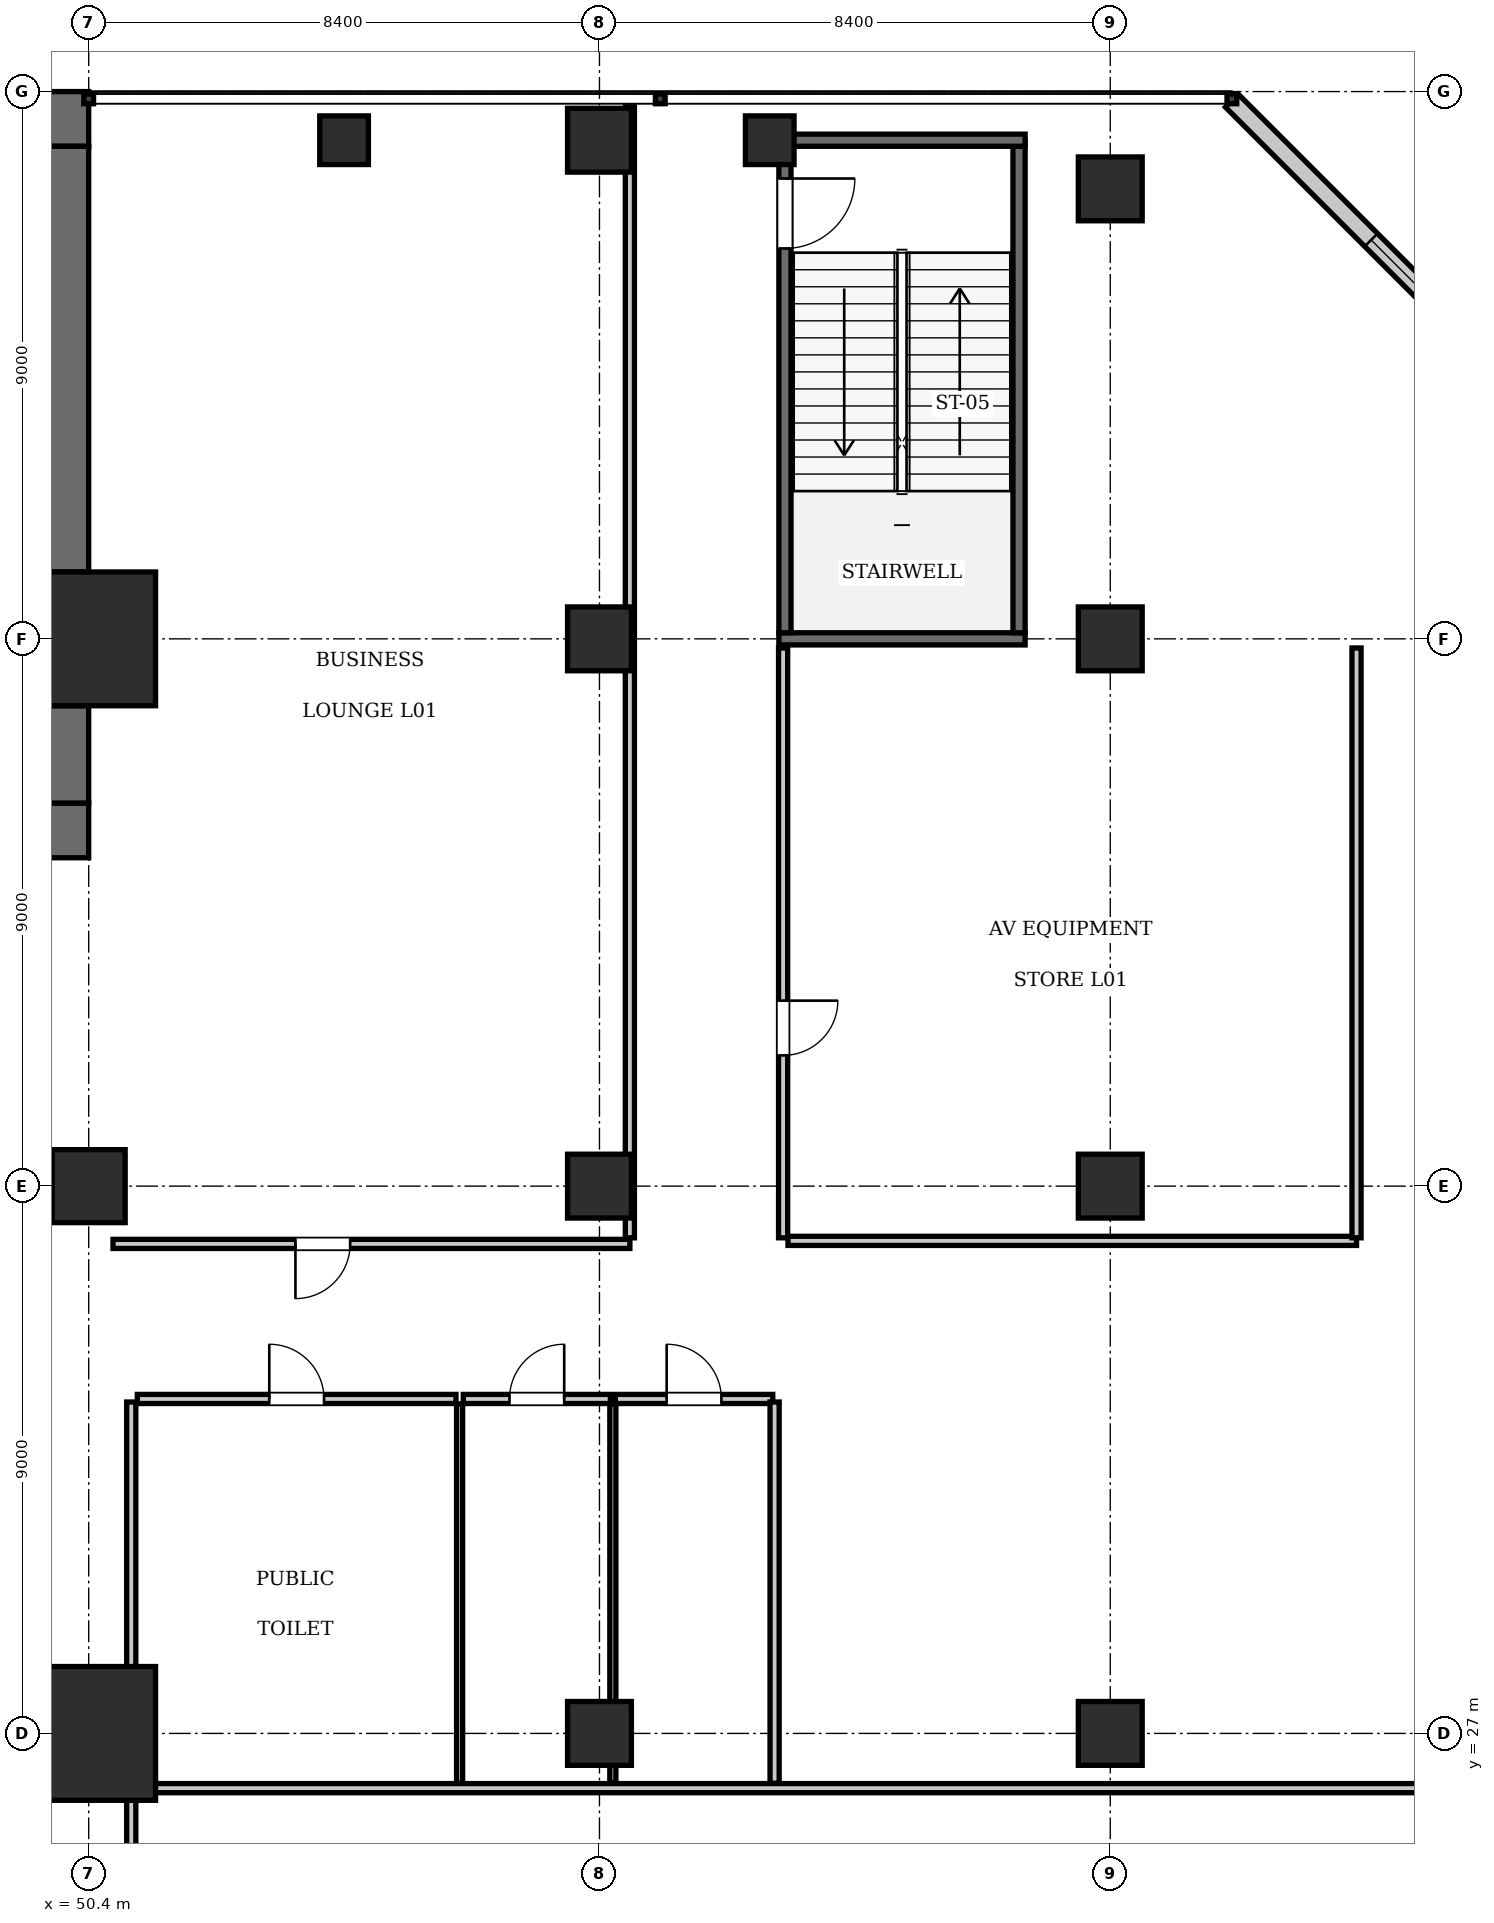
"""IFC4 building model, lengths in metres.
Left out: names, types, materials, properties, quantities, classifications, styles, units other than length and angle.
Written with IfcOpenShell. Run it as: python <this file> out.ifc"""

import sys

from ifc_helpers import new_model, si_unit, direction, frame, frame_2d, origin, origin_2d, place, context, subcontext, project, spatial, rectangle, extrude, element, fill, save


model = new_model("IFC4")
c1 = context("Model", 3, precision=1e-05, world=origin(), true_north=direction((0.0, 1.0)))
c2 = subcontext(c1, "Body", "Model", "MODEL_VIEW")
j1 = project(units=[si_unit("LENGTHUNIT", "METRE"), si_unit("PLANEANGLEUNIT", "RADIAN")], contexts=[c1])
p1 = place(None, origin())
s1 = spatial("IfcSite", under=j1, at=p1, CompositionType="ELEMENT")
p2 = place(p1, origin())
s2 = spatial("IfcBuilding", under=s1, at=p2, CompositionType="ELEMENT")
p3 = place(p2, frame((0.0, 0.0, 5.6)))
s3 = spatial("IfcBuildingStorey", under=s2, at=p3, CompositionType="ELEMENT", Elevation=5.6)
for number, where, z_axis, x_axis in (
    (1, (50.4, 27.0, 0.0), (0.0, 0.0, 1.0), (1.0, 0.0, 0.0)),
    (2, (50.4, 45.0, 0.0), (0.0, 0.0, 1.0), (1.0, 0.0, 0.0)),
):
    element("IfcColumn", number, at=place(p3, frame(where, z_axis=z_axis, x_axis=x_axis)), inside=s3, PredefinedType="COLUMN", context=c2, shape_type="SweptSolid", body=[
        extrude(rectangle(XDim=2.2, YDim=2.2, at=origin_2d()), origin(), (0.0, 0.0, 1.0), 5.25),
    ])
p4 = place(p3, frame((25.2, 53.55, 0.0), z_axis=(0.0, 0.0, 1.0), x_axis=(1.0, 0.0, 0.0)))
e3 = element("IfcWall", 3, at=p4, inside=s3, PredefinedType="SHEAR", context=c2, shape_type="SweptSolid", body=[
    extrude(rectangle(XDim=25.2, YDim=0.9, at=frame_2d((12.6, 0.0))), origin(), (0.0, 0.0, 1.0), 5.25),
])
p5 = place(p3, frame((43.6, 41.85, 0.0), z_axis=(0.0, 0.0, 1.0), x_axis=(1.0, 0.0, 0.0)))
e4 = element("IfcWall", 4, at=p5, inside=s3, PredefinedType="SHEAR", context=c2, shape_type="SweptSolid", body=[
    extrude(rectangle(XDim=6.8, YDim=0.9, at=frame_2d((3.4, 0.0))), origin(), (0.0, 0.0, 1.0), 5.25),
])
p6 = place(p5, frame((3.9, 0.0, 0.0)))
e5 = element("IfcOpeningElement", 5, at=p6, cuts=e4, PredefinedType="OPENING", context=c2, shape_type="SweptSolid", body=[
    extrude(rectangle(XDim=1.15, YDim=2.15, at=frame_2d((0.575, 1.075))), frame((0.0, 0.46, 0.0), z_axis=(0.0, -1.0, 0.0), x_axis=(1.0, 0.0, 0.0)), (0.0, 0.0, 1.0), 0.92),
])
p7 = place(p5, frame((0.55, 0.0, 0.0)))
e6 = element("IfcOpeningElement", 6, at=p7, cuts=e4, PredefinedType="OPENING", context=c2, shape_type="SweptSolid", body=[
    extrude(rectangle(XDim=1.1, YDim=2.2, at=frame_2d((0.55, 1.1))), frame((0.0, 0.46, 0.0), z_axis=(0.0, -1.0, 0.0), x_axis=(1.0, 0.0, 0.0)), (0.0, 0.0, 1.0), 0.92),
])
p8 = place(p3, frame((49.95, 42.3, 0.0), z_axis=(0.0, 0.0, 1.0), x_axis=(0.0, 1.0, 0.0)))
e7 = element("IfcWall", 7, at=p8, inside=s3, PredefinedType="SHEAR", context=c2, shape_type="SweptSolid", body=[
    extrude(rectangle(XDim=1.6, YDim=0.9, at=frame_2d((0.8, 0.0))), origin(), (0.0, 0.0, 1.0), 5.25),
])
p9 = place(p3, frame((49.95, 46.1, 0.0), z_axis=(0.0, 0.0, 1.0), x_axis=(0.0, 1.0, 0.0)))
e8 = element("IfcWall", 8, at=p9, inside=s3, PredefinedType="SHEAR", context=c2, shape_type="SweptSolid", body=[
    extrude(rectangle(XDim=7.0, YDim=0.9, at=frame_2d((3.5, 0.0))), origin(), (0.0, 0.0, 1.0), 5.25),
])
p10 = place(p3, frame((50.4, 36.0, 0.0), z_axis=(0.0, 0.0, 1.0), x_axis=(1.0, 0.0, 0.0)))
e9 = element("IfcColumn", 9, at=p10, inside=s3, PredefinedType="COLUMN", context=c2, shape_type="SweptSolid", body=[
    extrude(rectangle(XDim=1.2, YDim=1.2, at=origin_2d()), origin(), (0.0, 0.0, 1.0), 5.25),
])
for number, where, z_axis, x_axis in (
    (10, (58.8, 27.0, 0.0), (0.0, 0.0, 1.0), (1.0, 0.0, 0.0)),
    (11, (58.8, 36.0, 0.0), (0.0, 0.0, 1.0), (1.0, 0.0, 0.0)),
    (12, (58.8, 45.0, 0.0), (0.0, 0.0, 1.0), (1.0, 0.0, 0.0)),
    (13, (67.2, 27.0, 0.0), (0.0, 0.0, 1.0), (1.0, 0.0, 0.0)),
    (14, (67.2, 36.0, 0.0), (0.0, 0.0, 1.0), (1.0, 0.0, 0.0)),
    (15, (67.2, 45.0, 0.0), (0.0, 0.0, 1.0), (1.0, 0.0, 0.0)),
    (16, (67.2, 52.4, 0.0), (0.0, 0.0, 1.0), (1.0, 0.0, 0.0)),
    (17, (58.8, 53.2, 0.0), (0.0, 0.0, 1.0), (1.0, 0.0, 0.0)),
):
    element("IfcColumn", number, at=place(p3, frame(where, z_axis=z_axis, x_axis=x_axis)), inside=s3, PredefinedType="COLUMN", context=c2, shape_type="SweptSolid", body=[
        extrude(rectangle(XDim=1.05, YDim=1.05, at=origin_2d()), origin(), (0.0, 0.0, 1.0), 5.25),
    ])
for number, where, z_axis, x_axis in (
    (18, (54.6, 53.2, 0.0), (0.0, 0.0, 1.0), (1.0, 0.0, 0.0)),
    (19, (61.6, 53.2, 0.0), (0.0, 0.0, 1.0), (1.0, 0.0, 0.0)),
):
    element("IfcColumn", number, at=place(p3, frame(where, z_axis=z_axis, x_axis=x_axis)), inside=s3, PredefinedType="PILASTER", context=c2, shape_type="SweptSolid", body=[
        extrude(rectangle(XDim=0.8, YDim=0.8, at=origin_2d()), origin(), (0.0, 0.0, 1.0), 5.25),
    ])
p11 = place(p3, frame((61.75, 45.0, 0.0), z_axis=(0.0, 0.0, 1.0), x_axis=(1.0, 0.0, 0.0)))
e20 = element("IfcWall", 20, at=p11, inside=s3, PredefinedType="SOLIDWALL", context=c2, shape_type="SweptSolid", body=[
    extrude(rectangle(XDim=4.05, YDim=0.2, at=frame_2d((2.025, 0.0))), origin(), (0.0, 0.0, 1.0), 4.335),
])
p12 = place(p3, frame((61.85, 45.1, 0.0), z_axis=(0.0, 0.0, 1.0), x_axis=(0.0, 1.0, 0.0)))
e21 = element("IfcWall", 21, at=p12, inside=s3, PredefinedType="SOLIDWALL", context=c2, shape_type="SweptSolid", body=[
    extrude(rectangle(XDim=8.1, YDim=0.2, at=frame_2d((4.05, 0.0))), origin(), (0.0, 0.0, 1.0), 4.97),
])
p13 = place(p12, frame((6.32, 0.0, 0.0)))
e22 = element("IfcOpeningElement", 22, at=p13, cuts=e21, PredefinedType="OPENING", context=c2, shape_type="SweptSolid", body=[
    extrude(rectangle(XDim=1.15, YDim=2.15, at=frame_2d((0.575, 1.075))), frame((0.0, 0.11, 0.0), z_axis=(0.0, -1.0, 0.0), x_axis=(1.0, 0.0, 0.0)), (0.0, 0.0, 1.0), 0.22),
])
p14 = place(p3, frame((65.7, 45.1, 0.0), z_axis=(0.0, 0.0, 1.0), x_axis=(0.0, 1.0, 0.0)))
e23 = element("IfcWall", 23, at=p14, inside=s3, PredefinedType="SOLIDWALL", context=c2, shape_type="SweptSolid", body=[
    extrude(rectangle(XDim=8.1, YDim=0.2, at=frame_2d((4.05, 0.0))), origin(), (0.0, 0.0, 1.0), 4.97),
])
p15 = place(p3, frame((61.75, 53.2, 0.0), z_axis=(0.0, 0.0, 1.0), x_axis=(1.0, 0.0, 0.0)))
e24 = element("IfcWall", 24, at=p15, inside=s3, PredefinedType="SOLIDWALL", context=c2, shape_type="SweptSolid", body=[
    extrude(rectangle(XDim=4.05, YDim=0.2, at=frame_2d((2.025, 0.0))), origin(), (0.0, 0.0, 1.0), 4.97),
])
p16 = place(p3, frame((75.45, 47.6, 0.0), z_axis=(0.0, 0.0, 1.0), x_axis=(-0.707106781187, 0.707106781187, 0.0)))
e25 = element("IfcWall", 25, at=p16, inside=s3, PredefinedType="SOLIDWALL", context=c2, shape_type="SweptSolid", body=[
    extrude(rectangle(XDim=8.839, YDim=0.3, at=frame_2d((4.419, 0.0))), origin(), (0.0, 0.0, 1.0), 4.97),
])
p17 = place(p16, frame((3.2, 0.0, 0.9)))
e26 = element("IfcOpeningElement", 26, at=p17, cuts=e25, PredefinedType="OPENING", context=c2, shape_type="SweptSolid", body=[
    extrude(rectangle(XDim=2.4, YDim=2.6, at=frame_2d((1.2, 1.3))), frame((0.0, 0.16, 0.0), z_axis=(0.0, -1.0, 0.0), x_axis=(1.0, 0.0, 0.0)), (0.0, 0.0, 1.0), 0.32),
])
p18 = place(p3, frame((51.2, 32.5, 0.0), z_axis=(0.0, 0.0, 1.0), x_axis=(1.0, 0.0, 0.0)))
e27 = element("IfcWall", 27, at=p18, inside=s3, PredefinedType="PARTITIONING", context=c2, shape_type="SweptSolid", body=[
    extrude(rectangle(XDim=5.24, YDim=0.15, at=frame_2d((2.62, 0.0))), origin(), (0.0, 0.0, 1.0), 4.97),
])
p19 = place(p18, frame((2.17, 0.0, 0.0)))
e28 = element("IfcOpeningElement", 28, at=p19, cuts=e27, PredefinedType="OPENING", context=c2, shape_type="SweptSolid", body=[
    extrude(rectangle(XDim=0.9, YDim=2.1, at=frame_2d((0.45, 1.05))), frame((0.0, 0.085, 0.0), z_axis=(0.0, -1.0, 0.0), x_axis=(1.0, 0.0, 0.0)), (0.0, 0.0, 1.0), 0.17),
])
p20 = place(p3, frame((56.56, 32.5, 0.0), z_axis=(0.0, 0.0, 1.0), x_axis=(1.0, 0.0, 0.0)))
e29 = element("IfcWall", 29, at=p20, inside=s3, PredefinedType="PARTITIONING", context=c2, shape_type="SweptSolid", body=[
    extrude(rectangle(XDim=2.42, YDim=0.15, at=frame_2d((1.21, 0.0))), origin(), (0.0, 0.0, 1.0), 4.97),
])
p21 = place(p20, frame((0.76, 0.0, 0.0)))
e30 = element("IfcOpeningElement", 30, at=p21, cuts=e29, PredefinedType="OPENING", context=c2, shape_type="SweptSolid", body=[
    extrude(rectangle(XDim=0.9, YDim=2.1, at=frame_2d((0.45, 1.05))), frame((0.0, 0.085, 0.0), z_axis=(0.0, -1.0, 0.0), x_axis=(1.0, 0.0, 0.0)), (0.0, 0.0, 1.0), 0.17),
])
p22 = place(p3, frame((59.06, 32.5, 0.0), z_axis=(0.0, 0.0, 1.0), x_axis=(1.0, 0.0, 0.0)))
e31 = element("IfcWall", 31, at=p22, inside=s3, PredefinedType="PARTITIONING", context=c2, shape_type="SweptSolid", body=[
    extrude(rectangle(XDim=2.59, YDim=0.15, at=frame_2d((1.295, 0.0))), origin(), (0.0, 0.0, 1.0), 4.97),
])
p23 = place(p22, frame((0.845, 0.0, 0.0)))
e32 = element("IfcOpeningElement", 32, at=p23, cuts=e31, PredefinedType="OPENING", context=c2, shape_type="SweptSolid", body=[
    extrude(rectangle(XDim=0.9, YDim=2.1, at=frame_2d((0.45, 1.05))), frame((0.0, 0.085, 0.0), z_axis=(0.0, -1.0, 0.0), x_axis=(1.0, 0.0, 0.0)), (0.0, 0.0, 1.0), 0.17),
])
for number, where, z_axis, x_axis in (
    (33, (51.1, 26.18, 0.0), (0.0, 0.0, 1.0), (0.0, 1.0, 0.0)),
    (34, (61.68, 26.18, 0.0), (0.0, 0.0, 1.0), (0.0, 1.0, 0.0)),
):
    element("IfcWall", number, at=place(p3, frame(where, z_axis=z_axis, x_axis=x_axis)), inside=s3, PredefinedType="PARTITIONING", context=c2, shape_type="SweptSolid", body=[
        extrude(rectangle(XDim=6.27, YDim=0.15, at=frame_2d((3.135, 0.0))), origin(), (0.0, 0.0, 1.0), 4.97),
    ])
for number, where, z_axis, x_axis in (
    (35, (56.5, 26.18, 0.0), (0.0, 0.0, 1.0), (0.0, 1.0, 0.0)),
    (36, (59.02, 26.18, 0.0), (0.0, 0.0, 1.0), (0.0, 1.0, 0.0)),
):
    element("IfcWall", number, at=place(p3, frame(where, z_axis=z_axis, x_axis=x_axis)), inside=s3, PredefinedType="PARTITIONING", context=c2, shape_type="SweptSolid", body=[
        extrude(rectangle(XDim=6.24, YDim=0.1, at=frame_2d((3.12, 0.0))), origin(), (0.0, 0.0, 1.0), 4.97),
    ])
p24 = place(p3, frame((51.1, 6.8, 0.0), z_axis=(0.0, 0.0, 1.0), x_axis=(0.0, 1.0, 0.0)))
e37 = element("IfcWall", 37, at=p24, inside=s3, PredefinedType="PARTITIONING", context=c2, shape_type="SweptSolid", body=[
    extrude(rectangle(XDim=19.2, YDim=0.15, at=frame_2d((9.6, 0.0))), origin(), (0.0, 0.0, 1.0), 4.97),
])
p25 = place(p24, frame((6.0, 0.0, 0.0)))
e38 = element("IfcOpeningElement", 38, at=p25, cuts=e37, PredefinedType="OPENING", context=c2, shape_type="SweptSolid", body=[
    extrude(rectangle(XDim=1.4, YDim=2.2, at=frame_2d((0.7, 1.1))), frame((0.0, 0.085, 0.0), z_axis=(0.0, -1.0, 0.0), x_axis=(1.0, 0.0, 0.0)), (0.0, 0.0, 1.0), 0.17),
])
p26 = place(p3, frame((51.12, 26.1, 0.0), z_axis=(0.0, 0.0, 1.0), x_axis=(1.0, 0.0, 0.0)))
e39 = element("IfcWall", 39, at=p26, inside=s3, PredefinedType="PARTITIONING", context=c2, shape_type="SweptSolid", body=[
    extrude(rectangle(XDim=24.34, YDim=0.15, at=frame_2d((12.17, 0.0))), origin(), (0.0, 0.0, 1.0), 4.97),
])
p27 = place(p3, frame((50.8, 35.05, 0.0), z_axis=(0.0, 0.0, 1.0), x_axis=(1.0, 0.0, 0.0)))
e40 = element("IfcWall", 40, at=p27, inside=s3, PredefinedType="PARTITIONING", context=c2, shape_type="SweptSolid", body=[
    extrude(rectangle(XDim=8.5, YDim=0.15, at=frame_2d((4.25, 0.0))), origin(), (0.0, 0.0, 1.0), 4.97),
])
p28 = place(p27, frame((3.0, 0.0, 0.0)))
e41 = element("IfcOpeningElement", 41, at=p28, cuts=e40, PredefinedType="OPENING", context=c2, shape_type="SweptSolid", body=[
    extrude(rectangle(XDim=0.9, YDim=2.1, at=frame_2d((0.45, 1.05))), frame((0.0, 0.085, 0.0), z_axis=(0.0, -1.0, 0.0), x_axis=(1.0, 0.0, 0.0)), (0.0, 0.0, 1.0), 0.17),
])
p29 = place(p3, frame((59.3, 35.15, 0.0), z_axis=(0.0, 0.0, 1.0), x_axis=(0.0, 1.0, 0.0)))
e42 = element("IfcWall", 42, at=p29, inside=s3, PredefinedType="PARTITIONING", context=c2, shape_type="SweptSolid", body=[
    extrude(rectangle(XDim=18.6, YDim=0.15, at=frame_2d((9.3, 0.0))), origin(), (0.0, 0.0, 1.0), 4.97),
])
p30 = place(p3, frame((61.82, 35.15, 0.0), z_axis=(0.0, 0.0, 1.0), x_axis=(0.0, 1.0, 0.0)))
e43 = element("IfcWall", 43, at=p30, inside=s3, PredefinedType="PARTITIONING", context=c2, shape_type="SweptSolid", body=[
    extrude(rectangle(XDim=9.7, YDim=0.15, at=frame_2d((4.85, 0.0))), origin(), (0.0, 0.0, 1.0), 4.97),
])
p31 = place(p30, frame((3.0, 0.0, 0.0)))
e44 = element("IfcOpeningElement", 44, at=p31, cuts=e43, PredefinedType="OPENING", context=c2, shape_type="SweptSolid", body=[
    extrude(rectangle(XDim=0.9, YDim=2.1, at=frame_2d((0.45, 1.05))), frame((0.0, 0.085, 0.0), z_axis=(0.0, -1.0, 0.0), x_axis=(1.0, 0.0, 0.0)), (0.0, 0.0, 1.0), 0.17),
])
p32 = place(p3, frame((61.9, 35.1, 0.0), z_axis=(0.0, 0.0, 1.0), x_axis=(1.0, 0.0, 0.0)))
e45 = element("IfcWall", 45, at=p32, inside=s3, PredefinedType="PARTITIONING", context=c2, shape_type="SweptSolid", body=[
    extrude(rectangle(XDim=9.35, YDim=0.15, at=frame_2d((4.675, 0.0))), origin(), (0.0, 0.0, 1.0), 4.97),
])
p33 = place(p3, frame((71.25, 35.15, 0.0), z_axis=(0.0, 0.0, 1.0), x_axis=(0.0, 1.0, 0.0)))
e46 = element("IfcWall", 46, at=p33, inside=s3, PredefinedType="PARTITIONING", context=c2, shape_type="SweptSolid", body=[
    extrude(rectangle(XDim=9.7, YDim=0.15, at=frame_2d((4.85, 0.0))), origin(), (0.0, 0.0, 1.0), 4.97),
])
p34 = place(p13, frame((1.15, 0.0, 0.0), z_axis=(0.0, 0.0, 1.0), x_axis=(-1.0, 0.0, 0.0)))
e47 = element("IfcDoor", 47, at=p34, inside=s3, OperationType="SINGLE_SWING_LEFT", PredefinedType="DOOR", context=c2, shape_type="SweptSolid", body=[
    extrude(rectangle(XDim=1.15, YDim=2.15, at=frame_2d((0.575, 1.075))), frame((0.0, 0.025, 0.0), z_axis=(0.0, -1.0, 0.0), x_axis=(1.0, 0.0, 0.0)), (0.0, 0.0, 1.0), 0.05),
])
fill(e22, e47)
p35 = place(p17, origin())
e48 = element("IfcWindow", 48, at=p35, inside=s3, PartitioningType="SINGLE_PANEL", PredefinedType="WINDOW", context=c2, shape_type="SweptSolid", body=[
    extrude(rectangle(XDim=2.4, YDim=2.6, at=frame_2d((1.2, 1.3))), frame((0.0, 0.03, 0.0), z_axis=(0.0, -1.0, 0.0), x_axis=(1.0, 0.0, 0.0)), (0.0, 0.0, 1.0), 0.06),
])
fill(e26, e48)
p36 = place(p19, origin())
e49 = element("IfcDoor", 49, at=p36, inside=s3, OperationType="SINGLE_SWING_LEFT", PredefinedType="DOOR", context=c2, shape_type="SweptSolid", body=[
    extrude(rectangle(XDim=0.9, YDim=2.1, at=frame_2d((0.45, 1.05))), frame((0.0, 0.025, 0.0), z_axis=(0.0, -1.0, 0.0), x_axis=(1.0, 0.0, 0.0)), (0.0, 0.0, 1.0), 0.05),
])
fill(e28, e49)
p37 = place(p21, origin())
e50 = element("IfcDoor", 50, at=p37, inside=s3, OperationType="SINGLE_SWING_RIGHT", PredefinedType="DOOR", context=c2, shape_type="SweptSolid", body=[
    extrude(rectangle(XDim=0.9, YDim=2.1, at=frame_2d((0.45, 1.05))), frame((0.0, 0.025, 0.0), z_axis=(0.0, -1.0, 0.0), x_axis=(1.0, 0.0, 0.0)), (0.0, 0.0, 1.0), 0.05),
])
fill(e30, e50)
p38 = place(p23, origin())
e51 = element("IfcDoor", 51, at=p38, inside=s3, OperationType="SINGLE_SWING_LEFT", PredefinedType="DOOR", context=c2, shape_type="SweptSolid", body=[
    extrude(rectangle(XDim=0.9, YDim=2.1, at=frame_2d((0.45, 1.05))), frame((0.0, 0.025, 0.0), z_axis=(0.0, -1.0, 0.0), x_axis=(1.0, 0.0, 0.0)), (0.0, 0.0, 1.0), 0.05),
])
fill(e32, e51)
p39 = place(p28, frame((0.9, 0.0, 0.0), z_axis=(0.0, 0.0, 1.0), x_axis=(-1.0, 0.0, 0.0)))
e52 = element("IfcDoor", 52, at=p39, inside=s3, OperationType="SINGLE_SWING_RIGHT", PredefinedType="DOOR", context=c2, shape_type="SweptSolid", body=[
    extrude(rectangle(XDim=0.9, YDim=2.1, at=frame_2d((0.45, 1.05))), frame((0.0, 0.025, 0.0), z_axis=(0.0, -1.0, 0.0), x_axis=(1.0, 0.0, 0.0)), (0.0, 0.0, 1.0), 0.05),
])
fill(e41, e52)
p40 = place(p31, frame((0.9, 0.0, 0.0), z_axis=(0.0, 0.0, 1.0), x_axis=(-1.0, 0.0, 0.0)))
e53 = element("IfcDoor", 53, at=p40, inside=s3, OperationType="SINGLE_SWING_LEFT", PredefinedType="DOOR", context=c2, shape_type="SweptSolid", body=[
    extrude(rectangle(XDim=0.9, YDim=2.1, at=frame_2d((0.45, 1.05))), frame((0.0, 0.025, 0.0), z_axis=(0.0, -1.0, 0.0), x_axis=(1.0, 0.0, 0.0)), (0.0, 0.0, 1.0), 0.05),
])
fill(e44, e53)
save(model, sys.argv[1])
